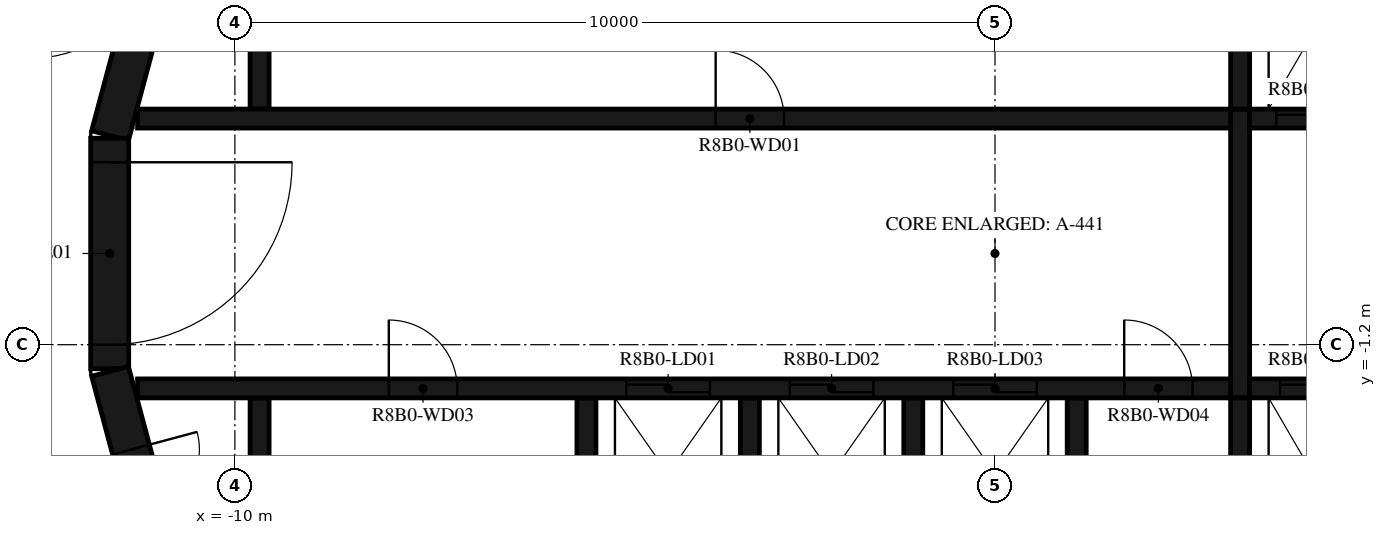
"""IFC4 building model, lengths in metres.
Left out: names, types, materials, properties, quantities, classifications, styles, units other than length and angle.
Written with IfcOpenShell. Run it as: python <this file> out.ifc"""

import sys

from ifc_helpers import new_model, si_unit, direction, frame, frame_2d, origin, place, context, subcontext, project, spatial, polyline, rectangle, outline, extrude, element, fill, save


model = new_model("IFC4")
c1 = context("Model", 3, precision=1e-05, world=origin(), true_north=direction((0.0, 1.0)))
c2 = subcontext(c1, "Body", "Model", "MODEL_VIEW")
j1 = project(units=[si_unit("LENGTHUNIT", "METRE"), si_unit("PLANEANGLEUNIT", "RADIAN")], contexts=[c1])
p1 = place(None, origin())
s1 = spatial("IfcSite", under=j1, at=p1, CompositionType="ELEMENT")
p2 = place(p1, origin())
s2 = spatial("IfcBuilding", under=s1, at=p2, CompositionType="ELEMENT")
p3 = place(p2, frame((0.0, 0.0, 312.2)))
s3 = spatial("IfcBuildingStorey", under=s2, at=p3, CompositionType="ELEMENT", Elevation=312.2)
p4 = place(p3, frame((-10.858, 4.479, 0.0), z_axis=(0.0, 0.0, 1.0), x_axis=(-0.258734743916, -0.965948410781, 0.0)))
e1 = element("IfcWall", 1, at=p4, inside=s3, PredefinedType="SHEAR", context=c2, shape_type="SweptSolid", body=[
    extrude(rectangle(XDim=3.033, YDim=0.5, at=frame_2d((1.516, 0.0))), origin(), (0.0, 0.0, 1.0), 3.12),
])
p5 = place(p3, frame((-11.647, 1.516, 0.0), z_axis=(0.0, 0.0, 1.0), x_axis=(0.0, -1.0, 0.0)))
e2 = element("IfcWall", 2, at=p5, inside=s3, PredefinedType="SHEAR", context=c2, shape_type="SweptSolid", body=[
    extrude(rectangle(XDim=3.033, YDim=0.5, at=frame_2d((1.516, 0.0))), origin(), (0.0, 0.0, 1.0), 3.12),
])
p6 = place(p5, frame((0.316, 0.0, 0.0)))
e3 = element("IfcOpeningElement", 3, at=p6, cuts=e2, PredefinedType="OPENING", context=c2, shape_type="SweptSolid", body=[
    extrude(rectangle(XDim=2.4, YDim=2.1, at=frame_2d((1.2, 1.05))), frame((0.0, 0.26, 0.0), z_axis=(0.0, -1.0, 0.0), x_axis=(1.0, 0.0, 0.0)), (0.0, 0.0, 1.0), 0.52),
])
p7 = place(p3, frame((-11.643, -1.55, 0.0), z_axis=(0.0, 0.0, 1.0), x_axis=(0.258734743916, -0.965948410781, 0.0)))
e4 = element("IfcWall", 4, at=p7, inside=s3, PredefinedType="SHEAR", context=c2, shape_type="SweptSolid", body=[
    extrude(rectangle(XDim=3.033, YDim=0.5, at=frame_2d((1.516, 0.0))), origin(), (0.0, 0.0, 1.0), 3.12),
])
p8 = place(p7, frame((1.066, 0.0, 0.0)))
e5 = element("IfcOpeningElement", 5, at=p8, cuts=e4, PredefinedType="OPENING", context=c2, shape_type="SweptSolid", body=[
    extrude(rectangle(XDim=0.9, YDim=2.1, at=frame_2d((0.45, 1.05))), frame((0.0, 0.26, 0.0), z_axis=(0.0, -1.0, 0.0), x_axis=(1.0, 0.0, 0.0)), (0.0, 0.0, 1.0), 0.52),
])
p9 = place(p3, origin())
e6 = element("IfcWall", 6, at=p9, inside=s3, PredefinedType="SHEAR", context=c2, shape_type="SweptSolid", body=[
    extrude(outline(polyline([(-9.8, 1.9), (-9.55, 1.9), (-9.55, 4.8), (3.1, 4.8), (3.1, 1.9), (3.35, 1.9), (3.35, 4.8), (5.25, 4.8), (5.25, 1.9), (5.5, 1.9), (5.5, 4.8), (7.4, 4.8), (7.4, 1.9), (7.65, 1.9), (7.65, 4.8), (9.55, 4.8), (9.55, 1.9), (9.8, 1.9), (9.8, 4.8), (9.8, 5.05), (-9.8, 5.05), (-9.8, 4.8), (-9.8, 1.9)])), origin(), (0.0, 0.0, 1.0), 3.12),
])
p10 = place(p3, origin())
e7 = element("IfcWall", 7, at=p10, inside=s3, PredefinedType="SHEAR", context=c2, shape_type="SweptSolid", body=[
    extrude(outline(polyline([(9.8, -5.05), (9.8, -4.8), (9.8, -1.9), (9.55, -1.9), (9.55, -4.8), (7.65, -4.8), (7.65, -1.9), (7.4, -1.9), (7.4, -4.8), (5.5, -4.8), (5.5, -1.9), (5.25, -1.9), (5.25, -4.8), (3.35, -4.8), (3.35, -1.9), (3.1, -1.9), (3.1, -4.8), (1.2, -4.8), (1.2, -1.9), (0.95, -1.9), (0.95, -4.8), (-0.95, -4.8), (-0.95, -1.9), (-1.2, -1.9), (-1.2, -4.8), (-3.1, -4.8), (-3.1, -1.9), (-3.35, -1.9), (-3.35, -4.8), (-5.25, -4.8), (-5.25, -1.9), (-5.5, -1.9), (-5.5, -4.8), (-9.55, -4.8), (-9.55, -1.9), (-9.8, -1.9), (-9.8, -4.8), (-9.8, -5.05), (9.8, -5.05)])), origin(), (0.0, 0.0, 1.0), 3.12),
])
p11 = place(p3, frame((-11.28, 1.775, 0.0), z_axis=(0.0, 0.0, 1.0), x_axis=(1.0, 0.0, 0.0)))
e8 = element("IfcWall", 8, at=p11, inside=s3, PredefinedType="SHEAR", context=c2, shape_type="SweptSolid", body=[
    extrude(rectangle(XDim=14.38, YDim=0.25, at=frame_2d((7.19, 0.0))), origin(), (0.0, 0.0, 1.0), 3.12),
])
p12 = place(p11, frame((7.605, 0.0, 0.0)))
e9 = element("IfcOpeningElement", 9, at=p12, cuts=e8, PredefinedType="OPENING", context=c2, shape_type="SweptSolid", body=[
    extrude(rectangle(XDim=0.9, YDim=2.1, at=frame_2d((0.45, 1.05))), frame((0.0, 0.135, 0.0), z_axis=(0.0, -1.0, 0.0), x_axis=(1.0, 0.0, 0.0)), (0.0, 0.0, 1.0), 0.27),
])
p13 = place(p3, frame((3.35, 1.775, 0.0), z_axis=(0.0, 0.0, 1.0), x_axis=(1.0, 0.0, 0.0)))
e10 = element("IfcWall", 10, at=p13, inside=s3, PredefinedType="SHEAR", context=c2, shape_type="SweptSolid", body=[
    extrude(rectangle(XDim=7.93, YDim=0.25, at=frame_2d((3.965, 0.0))), origin(), (0.0, 0.0, 1.0), 3.12),
])
p14 = place(p13, frame((0.35, 0.0, 0.0)))
e11 = element("IfcOpeningElement", 11, at=p14, cuts=e10, PredefinedType="OPENING", context=c2, shape_type="SweptSolid", body=[
    extrude(rectangle(XDim=1.2, YDim=2.4, at=frame_2d((0.6, 1.2))), frame((0.0, 0.135, 0.0), z_axis=(0.0, -1.0, 0.0), x_axis=(1.0, 0.0, 0.0)), (0.0, 0.0, 1.0), 0.27),
])
p15 = place(p13, frame((2.5, 0.0, 0.0)))
e12 = element("IfcOpeningElement", 12, at=p15, cuts=e10, PredefinedType="OPENING", context=c2, shape_type="SweptSolid", body=[
    extrude(rectangle(XDim=1.2, YDim=2.4, at=frame_2d((0.6, 1.2))), frame((0.0, 0.135, 0.0), z_axis=(0.0, -1.0, 0.0), x_axis=(1.0, 0.0, 0.0)), (0.0, 0.0, 1.0), 0.27),
])
p16 = place(p13, frame((4.8, 0.0, 0.0)))
e13 = element("IfcOpeningElement", 13, at=p16, cuts=e10, PredefinedType="OPENING", context=c2, shape_type="SweptSolid", body=[
    extrude(rectangle(XDim=0.9, YDim=2.1, at=frame_2d((0.45, 1.05))), frame((0.0, 0.135, 0.0), z_axis=(0.0, -1.0, 0.0), x_axis=(1.0, 0.0, 0.0)), (0.0, 0.0, 1.0), 0.27),
])
p17 = place(p3, frame((-11.28, -1.775, 0.0), z_axis=(0.0, 0.0, 1.0), x_axis=(1.0, 0.0, 0.0)))
e14 = element("IfcWall", 14, at=p17, inside=s3, PredefinedType="SHEAR", context=c2, shape_type="SweptSolid", body=[
    extrude(rectangle(XDim=14.38, YDim=0.25, at=frame_2d((7.19, 0.0))), origin(), (0.0, 0.0, 1.0), 3.12),
])
p18 = place(p17, frame((6.43, 0.0, 0.0)))
e15 = element("IfcOpeningElement", 15, at=p18, cuts=e14, PredefinedType="OPENING", context=c2, shape_type="SweptSolid", body=[
    extrude(rectangle(XDim=1.1, YDim=2.1, at=frame_2d((0.55, 1.05))), frame((0.0, 0.135, 0.0), z_axis=(0.0, -1.0, 0.0), x_axis=(1.0, 0.0, 0.0)), (0.0, 0.0, 1.0), 0.27),
])
p19 = place(p17, frame((8.58, 0.0, 0.0)))
e16 = element("IfcOpeningElement", 16, at=p19, cuts=e14, PredefinedType="OPENING", context=c2, shape_type="SweptSolid", body=[
    extrude(rectangle(XDim=1.1, YDim=2.1, at=frame_2d((0.55, 1.05))), frame((0.0, 0.135, 0.0), z_axis=(0.0, -1.0, 0.0), x_axis=(1.0, 0.0, 0.0)), (0.0, 0.0, 1.0), 0.27),
])
p20 = place(p17, frame((10.73, 0.0, 0.0)))
e17 = element("IfcOpeningElement", 17, at=p20, cuts=e14, PredefinedType="OPENING", context=c2, shape_type="SweptSolid", body=[
    extrude(rectangle(XDim=1.1, YDim=2.1, at=frame_2d((0.55, 1.05))), frame((0.0, 0.135, 0.0), z_axis=(0.0, -1.0, 0.0), x_axis=(1.0, 0.0, 0.0)), (0.0, 0.0, 1.0), 0.27),
])
p21 = place(p17, frame((3.305, 0.0, 0.0)))
e18 = element("IfcOpeningElement", 18, at=p21, cuts=e14, PredefinedType="OPENING", context=c2, shape_type="SweptSolid", body=[
    extrude(rectangle(XDim=0.9, YDim=2.1, at=frame_2d((0.45, 1.05))), frame((0.0, 0.135, 0.0), z_axis=(0.0, -1.0, 0.0), x_axis=(1.0, 0.0, 0.0)), (0.0, 0.0, 1.0), 0.27),
])
p22 = place(p17, frame((12.98, 0.0, 0.0)))
e19 = element("IfcOpeningElement", 19, at=p22, cuts=e14, PredefinedType="OPENING", context=c2, shape_type="SweptSolid", body=[
    extrude(rectangle(XDim=0.9, YDim=2.1, at=frame_2d((0.45, 1.05))), frame((0.0, 0.135, 0.0), z_axis=(0.0, -1.0, 0.0), x_axis=(1.0, 0.0, 0.0)), (0.0, 0.0, 1.0), 0.27),
])
p23 = place(p3, frame((3.35, -1.775, 0.0), z_axis=(0.0, 0.0, 1.0), x_axis=(1.0, 0.0, 0.0)))
e20 = element("IfcWall", 20, at=p23, inside=s3, PredefinedType="SHEAR", context=c2, shape_type="SweptSolid", body=[
    extrude(rectangle(XDim=7.93, YDim=0.25, at=frame_2d((3.965, 0.0))), origin(), (0.0, 0.0, 1.0), 3.12),
])
p24 = place(p23, frame((0.4, 0.0, 0.0)))
e21 = element("IfcOpeningElement", 21, at=p24, cuts=e20, PredefinedType="OPENING", context=c2, shape_type="SweptSolid", body=[
    extrude(rectangle(XDim=1.1, YDim=2.4, at=frame_2d((0.55, 1.2))), frame((0.0, 0.135, 0.0), z_axis=(0.0, -1.0, 0.0), x_axis=(1.0, 0.0, 0.0)), (0.0, 0.0, 1.0), 0.27),
])
p25 = place(p23, frame((2.55, 0.0, 0.0)))
e22 = element("IfcOpeningElement", 22, at=p25, cuts=e20, PredefinedType="OPENING", context=c2, shape_type="SweptSolid", body=[
    extrude(rectangle(XDim=1.1, YDim=2.4, at=frame_2d((0.55, 1.2))), frame((0.0, 0.135, 0.0), z_axis=(0.0, -1.0, 0.0), x_axis=(1.0, 0.0, 0.0)), (0.0, 0.0, 1.0), 0.27),
])
p26 = place(p23, frame((4.7, 0.0, 0.0)))
e23 = element("IfcOpeningElement", 23, at=p26, cuts=e20, PredefinedType="OPENING", context=c2, shape_type="SweptSolid", body=[
    extrude(rectangle(XDim=1.1, YDim=2.4, at=frame_2d((0.55, 1.2))), frame((0.0, 0.135, 0.0), z_axis=(0.0, -1.0, 0.0), x_axis=(1.0, 0.0, 0.0)), (0.0, 0.0, 1.0), 0.27),
])
p27 = place(p3, frame((3.225, -1.9, 0.0), z_axis=(0.0, 0.0, 1.0), x_axis=(0.0, 1.0, 0.0)))
e24 = element("IfcWall", 24, at=p27, inside=s3, PredefinedType="SHEAR", context=c2, shape_type="SweptSolid", body=[
    extrude(rectangle(XDim=3.8, YDim=0.25, at=frame_2d((1.9, 0.0))), origin(), (0.0, 0.0, 1.0), 3.12),
])
p28 = place(p3, frame((-12.074, 6.831, 0.0), z_axis=(0.0, 0.0, 1.0), x_axis=(-0.250391063186, -0.968144780225, 0.0)))
e25 = element("IfcWall", 25, at=p28, inside=s3, PredefinedType="STANDARD", context=c2, shape_type="SweptSolid", body=[
    extrude(rectangle(XDim=7.181, YDim=0.2, at=frame_2d((3.591, 0.0))), origin(), (0.0, 0.0, 1.0), 3.12),
])
p29 = place(p28, frame((2.548, 0.0, 0.0)))
e26 = element("IfcOpeningElement", 26, at=p29, cuts=e25, PredefinedType="OPENING", context=c2, shape_type="SweptSolid", body=[
    extrude(rectangle(XDim=1.8, YDim=2.1, at=frame_2d((0.9, 1.05))), frame((0.0, 0.11, 0.0), z_axis=(0.0, -1.0, 0.0), x_axis=(1.0, 0.0, 0.0)), (0.0, 0.0, 1.0), 0.22),
])
p30 = place(p3, frame((-13.872, -0.121, 0.0), z_axis=(0.0, 0.0, 1.0), x_axis=(0.267254575108, -0.963625960674, 0.0)))
e27 = element("IfcWall", 27, at=p30, inside=s3, PredefinedType="STANDARD", context=c2, shape_type="SweptSolid", body=[
    extrude(rectangle(XDim=7.181, YDim=0.2, at=frame_2d((3.591, 0.0))), origin(), (0.0, 0.0, 1.0), 3.12),
])
p31 = place(p6, origin())
e28 = element("IfcDoor", 28, at=p31, inside=s3, OperationType="DOUBLE_DOOR_SINGLE_SWING", PredefinedType="DOOR", context=c2, shape_type="SweptSolid", body=[
    extrude(rectangle(XDim=2.4, YDim=2.1, at=frame_2d((1.2, 1.05))), frame((0.0, 0.025, 0.0), z_axis=(0.0, -1.0, 0.0), x_axis=(1.0, 0.0, 0.0)), (0.0, 0.0, 1.0), 0.05),
])
fill(e3, e28)
p32 = place(p14, origin())
e29 = element("IfcDoor", 29, at=p32, inside=s3, OperationType="DOUBLE_DOOR_SLIDING", PredefinedType="DOOR", context=c2, shape_type="SweptSolid", body=[
    extrude(rectangle(XDim=1.2, YDim=2.4, at=frame_2d((0.6, 1.2))), frame((0.0, 0.025, 0.0), z_axis=(0.0, -1.0, 0.0), x_axis=(1.0, 0.0, 0.0)), (0.0, 0.0, 1.0), 0.05),
])
fill(e11, e29)
p33 = place(p18, origin())
e30 = element("IfcDoor", 30, at=p33, inside=s3, OperationType="DOUBLE_DOOR_SLIDING", PredefinedType="DOOR", context=c2, shape_type="SweptSolid", body=[
    extrude(rectangle(XDim=1.1, YDim=2.1, at=frame_2d((0.55, 1.05))), frame((0.0, 0.025, 0.0), z_axis=(0.0, -1.0, 0.0), x_axis=(1.0, 0.0, 0.0)), (0.0, 0.0, 1.0), 0.05),
])
fill(e15, e30)
p34 = place(p19, origin())
e31 = element("IfcDoor", 31, at=p34, inside=s3, OperationType="DOUBLE_DOOR_SLIDING", PredefinedType="DOOR", context=c2, shape_type="SweptSolid", body=[
    extrude(rectangle(XDim=1.1, YDim=2.1, at=frame_2d((0.55, 1.05))), frame((0.0, 0.025, 0.0), z_axis=(0.0, -1.0, 0.0), x_axis=(1.0, 0.0, 0.0)), (0.0, 0.0, 1.0), 0.05),
])
fill(e16, e31)
p35 = place(p20, origin())
e32 = element("IfcDoor", 32, at=p35, inside=s3, OperationType="DOUBLE_DOOR_SLIDING", PredefinedType="DOOR", context=c2, shape_type="SweptSolid", body=[
    extrude(rectangle(XDim=1.1, YDim=2.1, at=frame_2d((0.55, 1.05))), frame((0.0, 0.025, 0.0), z_axis=(0.0, -1.0, 0.0), x_axis=(1.0, 0.0, 0.0)), (0.0, 0.0, 1.0), 0.05),
])
fill(e17, e32)
p36 = place(p24, origin())
e33 = element("IfcDoor", 33, at=p36, inside=s3, OperationType="DOUBLE_DOOR_SLIDING", PredefinedType="DOOR", context=c2, shape_type="SweptSolid", body=[
    extrude(rectangle(XDim=1.1, YDim=2.4, at=frame_2d((0.55, 1.2))), frame((0.0, 0.025, 0.0), z_axis=(0.0, -1.0, 0.0), x_axis=(1.0, 0.0, 0.0)), (0.0, 0.0, 1.0), 0.05),
])
fill(e21, e33)
p37 = place(p12, origin())
e34 = element("IfcDoor", 34, at=p37, inside=s3, OperationType="SINGLE_SWING_LEFT", PredefinedType="DOOR", context=c2, shape_type="SweptSolid", body=[
    extrude(rectangle(XDim=0.9, YDim=2.1, at=frame_2d((0.45, 1.05))), frame((0.0, 0.025, 0.0), z_axis=(0.0, -1.0, 0.0), x_axis=(1.0, 0.0, 0.0)), (0.0, 0.0, 1.0), 0.05),
])
fill(e9, e34)
p38 = place(p21, origin())
e35 = element("IfcDoor", 35, at=p38, inside=s3, OperationType="SINGLE_SWING_LEFT", PredefinedType="DOOR", context=c2, shape_type="SweptSolid", body=[
    extrude(rectangle(XDim=0.9, YDim=2.1, at=frame_2d((0.45, 1.05))), frame((0.0, 0.025, 0.0), z_axis=(0.0, -1.0, 0.0), x_axis=(1.0, 0.0, 0.0)), (0.0, 0.0, 1.0), 0.05),
])
fill(e18, e35)
p39 = place(p22, origin())
e36 = element("IfcDoor", 36, at=p39, inside=s3, OperationType="SINGLE_SWING_RIGHT", PredefinedType="DOOR", context=c2, shape_type="SweptSolid", body=[
    extrude(rectangle(XDim=0.9, YDim=2.1, at=frame_2d((0.45, 1.05))), frame((0.0, 0.025, 0.0), z_axis=(0.0, -1.0, 0.0), x_axis=(1.0, 0.0, 0.0)), (0.0, 0.0, 1.0), 0.05),
])
fill(e19, e36)
p40 = place(p8, origin())
e37 = element("IfcDoor", 37, at=p40, inside=s3, OperationType="SINGLE_SWING_LEFT", PredefinedType="DOOR", context=c2, shape_type="SweptSolid", body=[
    extrude(rectangle(XDim=0.9, YDim=2.1, at=frame_2d((0.45, 1.05))), frame((0.0, 0.025, 0.0), z_axis=(0.0, -1.0, 0.0), x_axis=(1.0, 0.0, 0.0)), (0.0, 0.0, 1.0), 0.05),
])
fill(e5, e37)
save(model, sys.argv[1])
